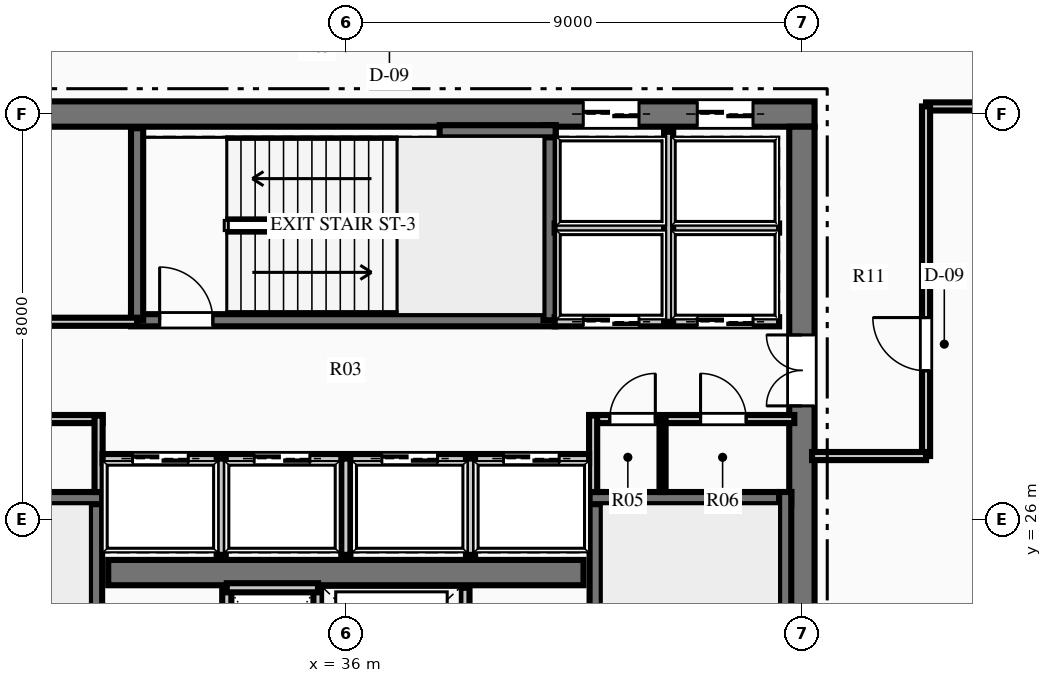
"""IFC4 building model, lengths in metres.
Left out: names, types, materials, properties, quantities, classifications, styles, units other than length and angle.
Written with IfcOpenShell. Run it as: python <this file> out.ifc"""

import sys

from ifc_helpers import new_model, si_unit, direction, frame, frame_2d, origin, place, context, subcontext, project, spatial, rectangle, extrude, element, fill, save


model = new_model("IFC4")
c1 = context("Model", 3, precision=1e-05, world=origin(), true_north=direction((0.0, 1.0)))
c2 = subcontext(c1, "Body", "Model", "MODEL_VIEW")
j1 = project(units=[si_unit("LENGTHUNIT", "METRE"), si_unit("PLANEANGLEUNIT", "RADIAN")], contexts=[c1])
p1 = place(None, origin())
s1 = spatial("IfcSite", under=j1, at=p1, CompositionType="ELEMENT")
p2 = place(p1, origin())
s2 = spatial("IfcBuilding", under=s1, at=p2, CompositionType="ELEMENT")
p3 = place(p2, frame((0.0, 0.0, 239.7)))
s3 = spatial("IfcBuildingStorey", under=s2, at=p3, CompositionType="ELEMENT", Elevation=239.7)
p4 = place(p3, frame((26.75, 34.0, 0.0), z_axis=(0.0, 0.0, 1.0), x_axis=(1.0, 0.0, 0.0)))
e1 = element("IfcWall", 1, at=p4, inside=s3, PredefinedType="SHEAR", context=c2, shape_type="SweptSolid", body=[
    extrude(rectangle(XDim=18.5, YDim=0.5, at=frame_2d((9.25, 0.0))), origin(), (0.0, 0.0, 1.0), 4.5),
])
p5 = place(p4, frame((13.935, 0.0, 0.0)))
e2 = element("IfcOpeningElement", 2, at=p5, cuts=e1, PredefinedType="OPENING", context=c2, shape_type="SweptSolid", body=[
    extrude(rectangle(XDim=1.1, YDim=2.15, at=frame_2d((0.55, 1.075))), frame((0.0, 0.26, 0.0), z_axis=(0.0, -1.0, 0.0), x_axis=(1.0, 0.0, 0.0)), (0.0, 0.0, 1.0), 0.52),
])
p6 = place(p4, frame((16.185, 0.0, 0.0)))
e3 = element("IfcOpeningElement", 3, at=p6, cuts=e1, PredefinedType="OPENING", context=c2, shape_type="SweptSolid", body=[
    extrude(rectangle(XDim=1.1, YDim=2.15, at=frame_2d((0.55, 1.075))), frame((0.0, 0.26, 0.0), z_axis=(0.0, -1.0, 0.0), x_axis=(1.0, 0.0, 0.0)), (0.0, 0.0, 1.0), 0.52),
])
p7 = place(p3, frame((45.0, 18.25, 0.0), z_axis=(0.0, 0.0, 1.0), x_axis=(0.0, 1.0, 0.0)))
e4 = element("IfcWall", 4, at=p7, inside=s3, PredefinedType="SHEAR", context=c2, shape_type="SweptSolid", body=[
    extrude(rectangle(XDim=15.5, YDim=0.5, at=frame_2d((7.75, 0.0))), origin(), (0.0, 0.0, 1.0), 4.5),
])
p8 = place(p7, frame((9.99, 0.0, 0.0)))
e5 = element("IfcOpeningElement", 5, at=p8, cuts=e4, PredefinedType="OPENING", context=c2, shape_type="SweptSolid", body=[
    extrude(rectangle(XDim=1.4, YDim=2.2, at=frame_2d((0.7, 1.1))), frame((0.0, 0.26, 0.0), z_axis=(0.0, -1.0, 0.0), x_axis=(1.0, 0.0, 0.0)), (0.0, 0.0, 1.0), 0.52),
])
p9 = place(p3, frame((31.31, 24.95, 0.0), z_axis=(0.0, 0.0, 1.0), x_axis=(1.0, 0.0, 0.0)))
e6 = element("IfcWall", 6, at=p9, inside=s3, PredefinedType="SHEAR", context=c2, shape_type="SweptSolid", body=[
    extrude(rectangle(XDim=9.38, YDim=0.5, at=frame_2d((4.69, 0.0))), origin(), (0.0, 0.0, 1.0), 4.5),
])
p10 = place(p3, frame((31.07, 18.28, 0.0), z_axis=(0.0, 0.0, 1.0), x_axis=(0.0, 1.0, 0.0)))
e7 = element("IfcWall", 7, at=p10, inside=s3, PredefinedType="SHEAR", context=c2, shape_type="SweptSolid", body=[
    extrude(rectangle(XDim=8.26, YDim=0.24, at=frame_2d((4.13, 0.0))), origin(), (0.0, 0.0, 1.0), 4.5),
])
p11 = place(p10, frame((0.365, 0.0, 0.0)))
e8 = element("IfcOpeningElement", 8, at=p11, cuts=e7, PredefinedType="OPENING", context=c2, shape_type="SweptSolid", body=[
    extrude(rectangle(XDim=1.05, YDim=2.15, at=frame_2d((0.525, 1.075))), frame((0.0, 0.13, 0.0), z_axis=(0.0, -1.0, 0.0), x_axis=(1.0, 0.0, 0.0)), (0.0, 0.0, 1.0), 0.26),
])
p12 = place(p3, frame((27.21, 26.42, 0.0), z_axis=(0.0, 0.0, 1.0), x_axis=(1.0, 0.0, 0.0)))
e9 = element("IfcWall", 9, at=p12, inside=s3, PredefinedType="SHEAR", context=c2, shape_type="SweptSolid", body=[
    extrude(rectangle(XDim=3.98, YDim=0.24, at=frame_2d((1.99, 0.0))), origin(), (0.0, 0.0, 1.0), 4.5),
])
p13 = place(p3, frame((40.93, 18.28, 0.0), z_axis=(0.0, 0.0, 1.0), x_axis=(0.0, 1.0, 0.0)))
e10 = element("IfcWall", 10, at=p13, inside=s3, PredefinedType="SHEAR", context=c2, shape_type="SweptSolid", body=[
    extrude(rectangle(XDim=8.26, YDim=0.24, at=frame_2d((4.13, 0.0))), origin(), (0.0, 0.0, 1.0), 4.5),
])
p14 = place(p13, frame((0.365, 0.0, 0.0)))
e11 = element("IfcOpeningElement", 11, at=p14, cuts=e10, PredefinedType="OPENING", context=c2, shape_type="SweptSolid", body=[
    extrude(rectangle(XDim=1.05, YDim=2.15, at=frame_2d((0.525, 1.075))), frame((0.0, 0.13, 0.0), z_axis=(0.0, -1.0, 0.0), x_axis=(1.0, 0.0, 0.0)), (0.0, 0.0, 1.0), 0.26),
])
p15 = place(p3, frame((40.81, 26.42, 0.0), z_axis=(0.0, 0.0, 1.0), x_axis=(1.0, 0.0, 0.0)))
e12 = element("IfcWall", 12, at=p15, inside=s3, PredefinedType="SHEAR", context=c2, shape_type="SweptSolid", body=[
    extrude(rectangle(XDim=3.98, YDim=0.24, at=frame_2d((1.99, 0.0))), origin(), (0.0, 0.0, 1.0), 4.5),
])
p16 = place(p3, frame((44.67, 18.28, 0.0), z_axis=(0.0, 0.0, 1.0), x_axis=(0.0, 1.0, 0.0)))
e13 = element("IfcWall", 13, at=p16, inside=s3, PredefinedType="SHEAR", context=c2, shape_type="SweptSolid", body=[
    extrude(rectangle(XDim=8.26, YDim=0.24, at=frame_2d((4.13, 0.0))), origin(), (0.0, 0.0, 1.0), 4.5),
])
p17 = place(p3, frame((31.76, 29.93, 0.0), z_axis=(0.0, 0.0, 1.0), x_axis=(1.0, 0.0, 0.0)))
e14 = element("IfcWall", 14, at=p17, inside=s3, PredefinedType="SHEAR", context=c2, shape_type="SweptSolid", body=[
    extrude(rectangle(XDim=8.38, YDim=0.24, at=frame_2d((4.19, 0.0))), origin(), (0.0, 0.0, 1.0), 4.5),
])
p18 = place(p17, frame((0.565, 0.0, 0.0)))
e15 = element("IfcOpeningElement", 15, at=p18, cuts=e14, PredefinedType="OPENING", context=c2, shape_type="SweptSolid", body=[
    extrude(rectangle(XDim=1.05, YDim=2.15, at=frame_2d((0.525, 1.075))), frame((0.0, 0.13, 0.0), z_axis=(0.0, -1.0, 0.0), x_axis=(1.0, 0.0, 0.0)), (0.0, 0.0, 1.0), 0.26),
])
p19 = place(p3, frame((31.88, 29.93, 0.0), z_axis=(0.0, 0.0, 1.0), x_axis=(0.0, 1.0, 0.0)))
e16 = element("IfcWall", 16, at=p19, inside=s3, PredefinedType="SHEAR", context=c2, shape_type="SweptSolid", body=[
    extrude(rectangle(XDim=3.79, YDim=0.24, at=frame_2d((1.895, 0.0))), origin(), (0.0, 0.0, 1.0), 4.5),
])
p20 = place(p3, frame((40.02, 29.93, 0.0), z_axis=(0.0, 0.0, 1.0), x_axis=(0.0, 1.0, 0.0)))
e17 = element("IfcWall", 17, at=p20, inside=s3, PredefinedType="SHEAR", context=c2, shape_type="SweptSolid", body=[
    extrude(rectangle(XDim=3.85, YDim=0.24, at=frame_2d((1.925, 0.0))), origin(), (0.0, 0.0, 1.0), 4.5),
])
p21 = place(p3, frame((37.85, 33.66, 0.0), z_axis=(0.0, 0.0, 1.0), x_axis=(1.0, 0.0, 0.0)))
e18 = element("IfcWall", 18, at=p21, inside=s3, PredefinedType="SHEAR", context=c2, shape_type="SweptSolid", body=[
    extrude(rectangle(XDim=2.29, YDim=0.24, at=frame_2d((1.145, 0.0))), origin(), (0.0, 0.0, 1.0), 4.5),
])
for number, where, z_axis, x_axis in (
    (19, (33.65, 22.05, 0.0), (0.0, 0.0, 1.0), (0.0, 1.0, 0.0)),
    (20, (35.45, 22.05, 0.0), (0.0, 0.0, 1.0), (0.0, 1.0, 0.0)),
):
    element("IfcWall", number, at=place(p3, frame(where, z_axis=z_axis, x_axis=x_axis)), inside=s3, PredefinedType="PARTITIONING", context=c2, shape_type="SweptSolid", body=[
        extrude(rectangle(XDim=2.6, YDim=0.18, at=frame_2d((1.3, 0.0))), origin(), (0.0, 0.0, 1.0), 4.1),
    ])
p22 = place(p3, frame((33.65, 24.65, 0.0), z_axis=(0.0, 0.0, 1.0), x_axis=(1.0, 0.0, 0.0)))
e21 = element("IfcWall", 21, at=p22, inside=s3, PredefinedType="PARTITIONING", context=c2, shape_type="SweptSolid", body=[
    extrude(rectangle(XDim=1.8, YDim=0.18, at=frame_2d((0.9, 0.0))), origin(), (0.0, 0.0, 1.0), 4.1),
])
p23 = place(p3, frame((38.35, 22.05, 0.0), z_axis=(0.0, 0.0, 1.0), x_axis=(0.0, 1.0, 0.0)))
e22 = element("IfcWall", 22, at=p23, inside=s3, PredefinedType="PARTITIONING", context=c2, shape_type="SweptSolid", body=[
    extrude(rectangle(XDim=2.6, YDim=0.18, at=frame_2d((1.3, 0.0))), origin(), (0.0, 0.0, 1.0), 4.1),
])
p24 = place(p3, frame((27.15, 27.98, 0.0), z_axis=(0.0, 0.0, 1.0), x_axis=(1.0, 0.0, 0.0)))
e23 = element("IfcWall", 23, at=p24, inside=s3, PredefinedType="PARTITIONING", context=c2, shape_type="SweptSolid", body=[
    extrude(rectangle(XDim=4.05, YDim=0.16, at=frame_2d((2.025, 0.0))), origin(), (0.0, 0.0, 1.0), 4.1),
])
p25 = place(p24, frame((1.625, 0.0, 0.0)))
e24 = element("IfcOpeningElement", 24, at=p25, cuts=e23, PredefinedType="OPENING", context=c2, shape_type="SweptSolid", body=[
    extrude(rectangle(XDim=0.95, YDim=2.15, at=frame_2d((0.475, 1.075))), frame((0.0, 0.09, 0.0), z_axis=(0.0, -1.0, 0.0), x_axis=(1.0, 0.0, 0.0)), (0.0, 0.0, 1.0), 0.18),
])
p26 = place(p3, frame((31.12, 26.54, 0.0), z_axis=(0.0, 0.0, 1.0), x_axis=(0.0, 1.0, 0.0)))
e25 = element("IfcWall", 25, at=p26, inside=s3, PredefinedType="PARTITIONING", context=c2, shape_type="SweptSolid", body=[
    extrude(rectangle(XDim=1.51, YDim=0.16, at=frame_2d((0.755, 0.0))), origin(), (0.0, 0.0, 1.0), 4.1),
])
p27 = place(p3, frame((40.8, 27.98, 0.0), z_axis=(0.0, 0.0, 1.0), x_axis=(1.0, 0.0, 0.0)))
e26 = element("IfcWall", 26, at=p27, inside=s3, PredefinedType="PARTITIONING", context=c2, shape_type="SweptSolid", body=[
    extrude(rectangle(XDim=4.05, YDim=0.16, at=frame_2d((2.025, 0.0))), origin(), (0.0, 0.0, 1.0), 4.1),
])
p28 = place(p27, frame((0.407, 0.0, 0.0)))
e27 = element("IfcOpeningElement", 27, at=p28, cuts=e26, PredefinedType="OPENING", context=c2, shape_type="SweptSolid", body=[
    extrude(rectangle(XDim=0.9, YDim=2.15, at=frame_2d((0.45, 1.075))), frame((0.0, 0.09, 0.0), z_axis=(0.0, -1.0, 0.0), x_axis=(1.0, 0.0, 0.0)), (0.0, 0.0, 1.0), 0.18),
])
p29 = place(p27, frame((2.2, 0.0, 0.0)))
e28 = element("IfcOpeningElement", 28, at=p29, cuts=e26, PredefinedType="OPENING", context=c2, shape_type="SweptSolid", body=[
    extrude(rectangle(XDim=0.9, YDim=2.15, at=frame_2d((0.45, 1.075))), frame((0.0, 0.09, 0.0), z_axis=(0.0, -1.0, 0.0), x_axis=(1.0, 0.0, 0.0)), (0.0, 0.0, 1.0), 0.18),
])
p30 = place(p3, frame((40.88, 26.54, 0.0), z_axis=(0.0, 0.0, 1.0), x_axis=(0.0, 1.0, 0.0)))
e29 = element("IfcWall", 29, at=p30, inside=s3, PredefinedType="PARTITIONING", context=c2, shape_type="SweptSolid", body=[
    extrude(rectangle(XDim=1.51, YDim=0.16, at=frame_2d((0.755, 0.0))), origin(), (0.0, 0.0, 1.0), 4.1),
])
p31 = place(p3, frame((42.25, 26.54, 0.0), z_axis=(0.0, 0.0, 1.0), x_axis=(0.0, 1.0, 0.0)))
e30 = element("IfcWall", 30, at=p31, inside=s3, PredefinedType="PARTITIONING", context=c2, shape_type="SweptSolid", body=[
    extrude(rectangle(XDim=1.44, YDim=0.12, at=frame_2d((0.72, 0.0))), origin(), (0.0, 0.0, 1.0), 4.1),
])
p32 = place(p3, frame((27.45, 29.9, 0.0), z_axis=(0.0, 0.0, 1.0), x_axis=(1.0, 0.0, 0.0)))
e31 = element("IfcWall", 31, at=p32, inside=s3, PredefinedType="PARTITIONING", context=c2, shape_type="SweptSolid", body=[
    extrude(rectangle(XDim=4.43, YDim=0.16, at=frame_2d((2.215, 0.0))), origin(), (0.0, 0.0, 1.0), 4.1),
])
p33 = place(p32, frame((1.675, 0.0, 0.0)))
e32 = element("IfcOpeningElement", 32, at=p33, cuts=e31, PredefinedType="OPENING", context=c2, shape_type="SweptSolid", body=[
    extrude(rectangle(XDim=0.95, YDim=2.15, at=frame_2d((0.475, 1.075))), frame((0.0, 0.09, 0.0), z_axis=(0.0, -1.0, 0.0), x_axis=(1.0, 0.0, 0.0)), (0.0, 0.0, 1.0), 0.18),
])
p34 = place(p3, frame((40.12, 29.9, 0.0), z_axis=(0.0, 0.0, 1.0), x_axis=(1.0, 0.0, 0.0)))
e33 = element("IfcWall", 33, at=p34, inside=s3, PredefinedType="PARTITIONING", context=c2, shape_type="SweptSolid", body=[
    extrude(rectangle(XDim=4.43, YDim=0.18, at=frame_2d((2.215, 0.0))), origin(), (0.0, 0.0, 1.0), 4.1),
])
p35 = place(p34, frame((0.565, 0.0, 0.0)))
e34 = element("IfcOpeningElement", 34, at=p35, cuts=e33, PredefinedType="OPENING", context=c2, shape_type="SweptSolid", body=[
    extrude(rectangle(XDim=1.1, YDim=2.15, at=frame_2d((0.55, 1.075))), frame((0.0, 0.1, 0.0), z_axis=(0.0, -1.0, 0.0), x_axis=(1.0, 0.0, 0.0)), (0.0, 0.0, 1.0), 0.2),
])
p36 = place(p34, frame((2.815, 0.0, 0.0)))
e35 = element("IfcOpeningElement", 35, at=p36, cuts=e33, PredefinedType="OPENING", context=c2, shape_type="SweptSolid", body=[
    extrude(rectangle(XDim=1.1, YDim=2.15, at=frame_2d((0.55, 1.075))), frame((0.0, 0.1, 0.0), z_axis=(0.0, -1.0, 0.0), x_axis=(1.0, 0.0, 0.0)), (0.0, 0.0, 1.0), 0.2),
])
p37 = place(p3, frame((40.12, 31.75, 0.0), z_axis=(0.0, 0.0, 1.0), x_axis=(1.0, 0.0, 0.0)))
e36 = element("IfcWall", 36, at=p37, inside=s3, PredefinedType="PARTITIONING", context=c2, shape_type="SweptSolid", body=[
    extrude(rectangle(XDim=4.43, YDim=0.18, at=frame_2d((2.215, 0.0))), origin(), (0.0, 0.0, 1.0), 4.1),
])
p38 = place(p3, frame((42.37, 29.9, 0.0), z_axis=(0.0, 0.0, 1.0), x_axis=(0.0, 1.0, 0.0)))
e37 = element("IfcWall", 37, at=p38, inside=s3, PredefinedType="PARTITIONING", context=c2, shape_type="SweptSolid", body=[
    extrude(rectangle(XDim=3.75, YDim=0.18, at=frame_2d((1.875, 0.0))), origin(), (0.0, 0.0, 1.0), 4.1),
])
p39 = place(p3, frame((31.2, 27.2, 0.0), z_axis=(0.0, 0.0, 1.0), x_axis=(1.0, 0.0, 0.0)))
e38 = element("IfcWall", 38, at=p39, inside=s3, PredefinedType="PARTITIONING", context=c2, shape_type="SweptSolid", body=[
    extrude(rectangle(XDim=9.6, YDim=0.18, at=frame_2d((4.8, 0.0))), origin(), (0.0, 0.0, 1.0), 4.1),
])
p40 = place(p39, frame((0.59, 0.0, 0.0)))
e39 = element("IfcOpeningElement", 39, at=p40, cuts=e38, PredefinedType="OPENING", context=c2, shape_type="SweptSolid", body=[
    extrude(rectangle(XDim=1.1, YDim=2.15, at=frame_2d((0.55, 1.075))), frame((0.0, 0.1, 0.0), z_axis=(0.0, -1.0, 0.0), x_axis=(1.0, 0.0, 0.0)), (0.0, 0.0, 1.0), 0.2),
])
p41 = place(p39, frame((2.99, 0.0, 0.0)))
e40 = element("IfcOpeningElement", 40, at=p41, cuts=e38, PredefinedType="OPENING", context=c2, shape_type="SweptSolid", body=[
    extrude(rectangle(XDim=1.1, YDim=2.15, at=frame_2d((0.55, 1.075))), frame((0.0, 0.1, 0.0), z_axis=(0.0, -1.0, 0.0), x_axis=(1.0, 0.0, 0.0)), (0.0, 0.0, 1.0), 0.2),
])
p42 = place(p39, frame((5.51, 0.0, 0.0)))
e41 = element("IfcOpeningElement", 41, at=p42, cuts=e38, PredefinedType="OPENING", context=c2, shape_type="SweptSolid", body=[
    extrude(rectangle(XDim=1.1, YDim=2.15, at=frame_2d((0.55, 1.075))), frame((0.0, 0.1, 0.0), z_axis=(0.0, -1.0, 0.0), x_axis=(1.0, 0.0, 0.0)), (0.0, 0.0, 1.0), 0.2),
])
p43 = place(p39, frame((7.91, 0.0, 0.0)))
e42 = element("IfcOpeningElement", 42, at=p43, cuts=e38, PredefinedType="OPENING", context=c2, shape_type="SweptSolid", body=[
    extrude(rectangle(XDim=1.1, YDim=2.15, at=frame_2d((0.55, 1.075))), frame((0.0, 0.1, 0.0), z_axis=(0.0, -1.0, 0.0), x_axis=(1.0, 0.0, 0.0)), (0.0, 0.0, 1.0), 0.2),
])
for number, where, z_axis, x_axis in (
    (43, (33.54, 25.3, 0.0), (0.0, 0.0, 1.0), (0.0, 1.0, 0.0)),
    (44, (36.0, 25.3, 0.0), (0.0, 0.0, 1.0), (0.0, 1.0, 0.0)),
    (45, (38.46, 25.3, 0.0), (0.0, 0.0, 1.0), (0.0, 1.0, 0.0)),
):
    element("IfcWall", number, at=place(p3, frame(where, z_axis=z_axis, x_axis=x_axis)), inside=s3, PredefinedType="PARTITIONING", context=c2, shape_type="SweptSolid", body=[
        extrude(rectangle(XDim=1.9, YDim=0.18, at=frame_2d((0.95, 0.0))), origin(), (0.0, 0.0, 1.0), 4.1),
    ])
p44 = place(p3, frame((47.45, 34.15, 0.0), z_axis=(0.0, 0.0, 1.0), x_axis=(1.0, 0.0, 0.0)))
e46 = element("IfcWall", 46, at=p44, inside=s3, PredefinedType="PARTITIONING", context=c2, shape_type="SweptSolid", body=[
    extrude(rectangle(XDim=6.35, YDim=0.16, at=frame_2d((3.175, 0.0))), origin(), (0.0, 0.0, 1.0), 2.595),
])
p45 = place(p3, frame((47.45, 27.25, 0.0), z_axis=(0.0, 0.0, 1.0), x_axis=(0.0, 1.0, 0.0)))
e47 = element("IfcWall", 47, at=p45, inside=s3, PredefinedType="PARTITIONING", context=c2, shape_type="SweptSolid", body=[
    extrude(rectangle(XDim=6.9, YDim=0.16, at=frame_2d((3.45, 0.0))), origin(), (0.0, 0.0, 1.0), 4.1),
])
p46 = place(p45, frame((1.683, 0.0, 0.0)))
e48 = element("IfcOpeningElement", 48, at=p46, cuts=e47, PredefinedType="OPENING", context=c2, shape_type="SweptSolid", body=[
    extrude(rectangle(XDim=1.05, YDim=2.15, at=frame_2d((0.525, 1.075))), frame((0.0, 0.09, 0.0), z_axis=(0.0, -1.0, 0.0), x_axis=(1.0, 0.0, 0.0)), (0.0, 0.0, 1.0), 0.18),
])
p47 = place(p3, frame((45.2, 27.25, 0.0), z_axis=(0.0, 0.0, 1.0), x_axis=(1.0, 0.0, 0.0)))
e49 = element("IfcWall", 49, at=p47, inside=s3, PredefinedType="PARTITIONING", context=c2, shape_type="SweptSolid", body=[
    extrude(rectangle(XDim=2.25, YDim=0.16, at=frame_2d((1.125, 0.0))), origin(), (0.0, 0.0, 1.0), 4.1),
])
p48 = place(p28, origin())
e50 = element("IfcDoor", 50, at=p48, inside=s3, OperationType="SINGLE_SWING_RIGHT", PredefinedType="DOOR", context=c2, shape_type="SweptSolid", body=[
    extrude(rectangle(XDim=0.9, YDim=2.15, at=frame_2d((0.45, 1.075))), frame((0.0, 0.025, 0.0), z_axis=(0.0, -1.0, 0.0), x_axis=(1.0, 0.0, 0.0)), (0.0, 0.0, 1.0), 0.05),
])
fill(e27, e50)
p49 = place(p29, origin())
e51 = element("IfcDoor", 51, at=p49, inside=s3, OperationType="SINGLE_SWING_LEFT", PredefinedType="DOOR", context=c2, shape_type="SweptSolid", body=[
    extrude(rectangle(XDim=0.9, YDim=2.15, at=frame_2d((0.45, 1.075))), frame((0.0, 0.025, 0.0), z_axis=(0.0, -1.0, 0.0), x_axis=(1.0, 0.0, 0.0)), (0.0, 0.0, 1.0), 0.05),
])
fill(e28, e51)
p50 = place(p18, origin())
e52 = element("IfcDoor", 52, at=p50, inside=s3, OperationType="SINGLE_SWING_LEFT", PredefinedType="DOOR", context=c2, shape_type="SweptSolid", body=[
    extrude(rectangle(XDim=1.05, YDim=2.15, at=frame_2d((0.525, 1.075))), frame((0.0, 0.025, 0.0), z_axis=(0.0, -1.0, 0.0), x_axis=(1.0, 0.0, 0.0)), (0.0, 0.0, 1.0), 0.05),
])
fill(e15, e52)
p51 = place(p8, origin())
e53 = element("IfcDoor", 53, at=p51, inside=s3, OperationType="DOUBLE_DOOR_SINGLE_SWING", PredefinedType="DOOR", context=c2, shape_type="SweptSolid", body=[
    extrude(rectangle(XDim=1.4, YDim=2.2, at=frame_2d((0.7, 1.1))), frame((0.0, 0.025, 0.0), z_axis=(0.0, -1.0, 0.0), x_axis=(1.0, 0.0, 0.0)), (0.0, 0.0, 1.0), 0.05),
])
fill(e5, e53)
p52 = place(p46, origin())
e54 = element("IfcDoor", 54, at=p52, inside=s3, OperationType="SINGLE_SWING_RIGHT", PredefinedType="DOOR", context=c2, shape_type="SweptSolid", body=[
    extrude(rectangle(XDim=1.05, YDim=2.15, at=frame_2d((0.525, 1.075))), frame((0.0, 0.025, 0.0), z_axis=(0.0, -1.0, 0.0), x_axis=(1.0, 0.0, 0.0)), (0.0, 0.0, 1.0), 0.05),
])
fill(e48, e54)
p53 = place(p35, origin())
e55 = element("IfcDoor", 55, at=p53, inside=s3, OperationType="SLIDING_TO_LEFT", PredefinedType="DOOR", context=c2, shape_type="SweptSolid", body=[
    extrude(rectangle(XDim=1.1, YDim=2.15, at=frame_2d((0.55, 1.075))), frame((0.0, 0.025, 0.0), z_axis=(0.0, -1.0, 0.0), x_axis=(1.0, 0.0, 0.0)), (0.0, 0.0, 1.0), 0.05),
])
fill(e34, e55)
p54 = place(p36, origin())
e56 = element("IfcDoor", 56, at=p54, inside=s3, OperationType="SLIDING_TO_LEFT", PredefinedType="DOOR", context=c2, shape_type="SweptSolid", body=[
    extrude(rectangle(XDim=1.1, YDim=2.15, at=frame_2d((0.55, 1.075))), frame((0.0, 0.025, 0.0), z_axis=(0.0, -1.0, 0.0), x_axis=(1.0, 0.0, 0.0)), (0.0, 0.0, 1.0), 0.05),
])
fill(e35, e56)
p55 = place(p5, origin())
e57 = element("IfcDoor", 57, at=p55, inside=s3, OperationType="SLIDING_TO_LEFT", PredefinedType="DOOR", context=c2, shape_type="SweptSolid", body=[
    extrude(rectangle(XDim=1.1, YDim=2.15, at=frame_2d((0.55, 1.075))), frame((0.0, 0.025, 0.0), z_axis=(0.0, -1.0, 0.0), x_axis=(1.0, 0.0, 0.0)), (0.0, 0.0, 1.0), 0.05),
])
fill(e2, e57)
p56 = place(p6, origin())
e58 = element("IfcDoor", 58, at=p56, inside=s3, OperationType="SLIDING_TO_LEFT", PredefinedType="DOOR", context=c2, shape_type="SweptSolid", body=[
    extrude(rectangle(XDim=1.1, YDim=2.15, at=frame_2d((0.55, 1.075))), frame((0.0, 0.025, 0.0), z_axis=(0.0, -1.0, 0.0), x_axis=(1.0, 0.0, 0.0)), (0.0, 0.0, 1.0), 0.05),
])
fill(e3, e58)
p57 = place(p40, origin())
e59 = element("IfcDoor", 59, at=p57, inside=s3, OperationType="SLIDING_TO_LEFT", PredefinedType="DOOR", context=c2, shape_type="SweptSolid", body=[
    extrude(rectangle(XDim=1.1, YDim=2.15, at=frame_2d((0.55, 1.075))), frame((0.0, 0.025, 0.0), z_axis=(0.0, -1.0, 0.0), x_axis=(1.0, 0.0, 0.0)), (0.0, 0.0, 1.0), 0.05),
])
fill(e39, e59)
p58 = place(p41, origin())
e60 = element("IfcDoor", 60, at=p58, inside=s3, OperationType="SLIDING_TO_LEFT", PredefinedType="DOOR", context=c2, shape_type="SweptSolid", body=[
    extrude(rectangle(XDim=1.1, YDim=2.15, at=frame_2d((0.55, 1.075))), frame((0.0, 0.025, 0.0), z_axis=(0.0, -1.0, 0.0), x_axis=(1.0, 0.0, 0.0)), (0.0, 0.0, 1.0), 0.05),
])
fill(e40, e60)
p59 = place(p42, origin())
e61 = element("IfcDoor", 61, at=p59, inside=s3, OperationType="SLIDING_TO_LEFT", PredefinedType="DOOR", context=c2, shape_type="SweptSolid", body=[
    extrude(rectangle(XDim=1.1, YDim=2.15, at=frame_2d((0.55, 1.075))), frame((0.0, 0.025, 0.0), z_axis=(0.0, -1.0, 0.0), x_axis=(1.0, 0.0, 0.0)), (0.0, 0.0, 1.0), 0.05),
])
fill(e41, e61)
p60 = place(p43, origin())
e62 = element("IfcDoor", 62, at=p60, inside=s3, OperationType="SLIDING_TO_LEFT", PredefinedType="DOOR", context=c2, shape_type="SweptSolid", body=[
    extrude(rectangle(XDim=1.1, YDim=2.15, at=frame_2d((0.55, 1.075))), frame((0.0, 0.025, 0.0), z_axis=(0.0, -1.0, 0.0), x_axis=(1.0, 0.0, 0.0)), (0.0, 0.0, 1.0), 0.05),
])
fill(e42, e62)
save(model, sys.argv[1])
